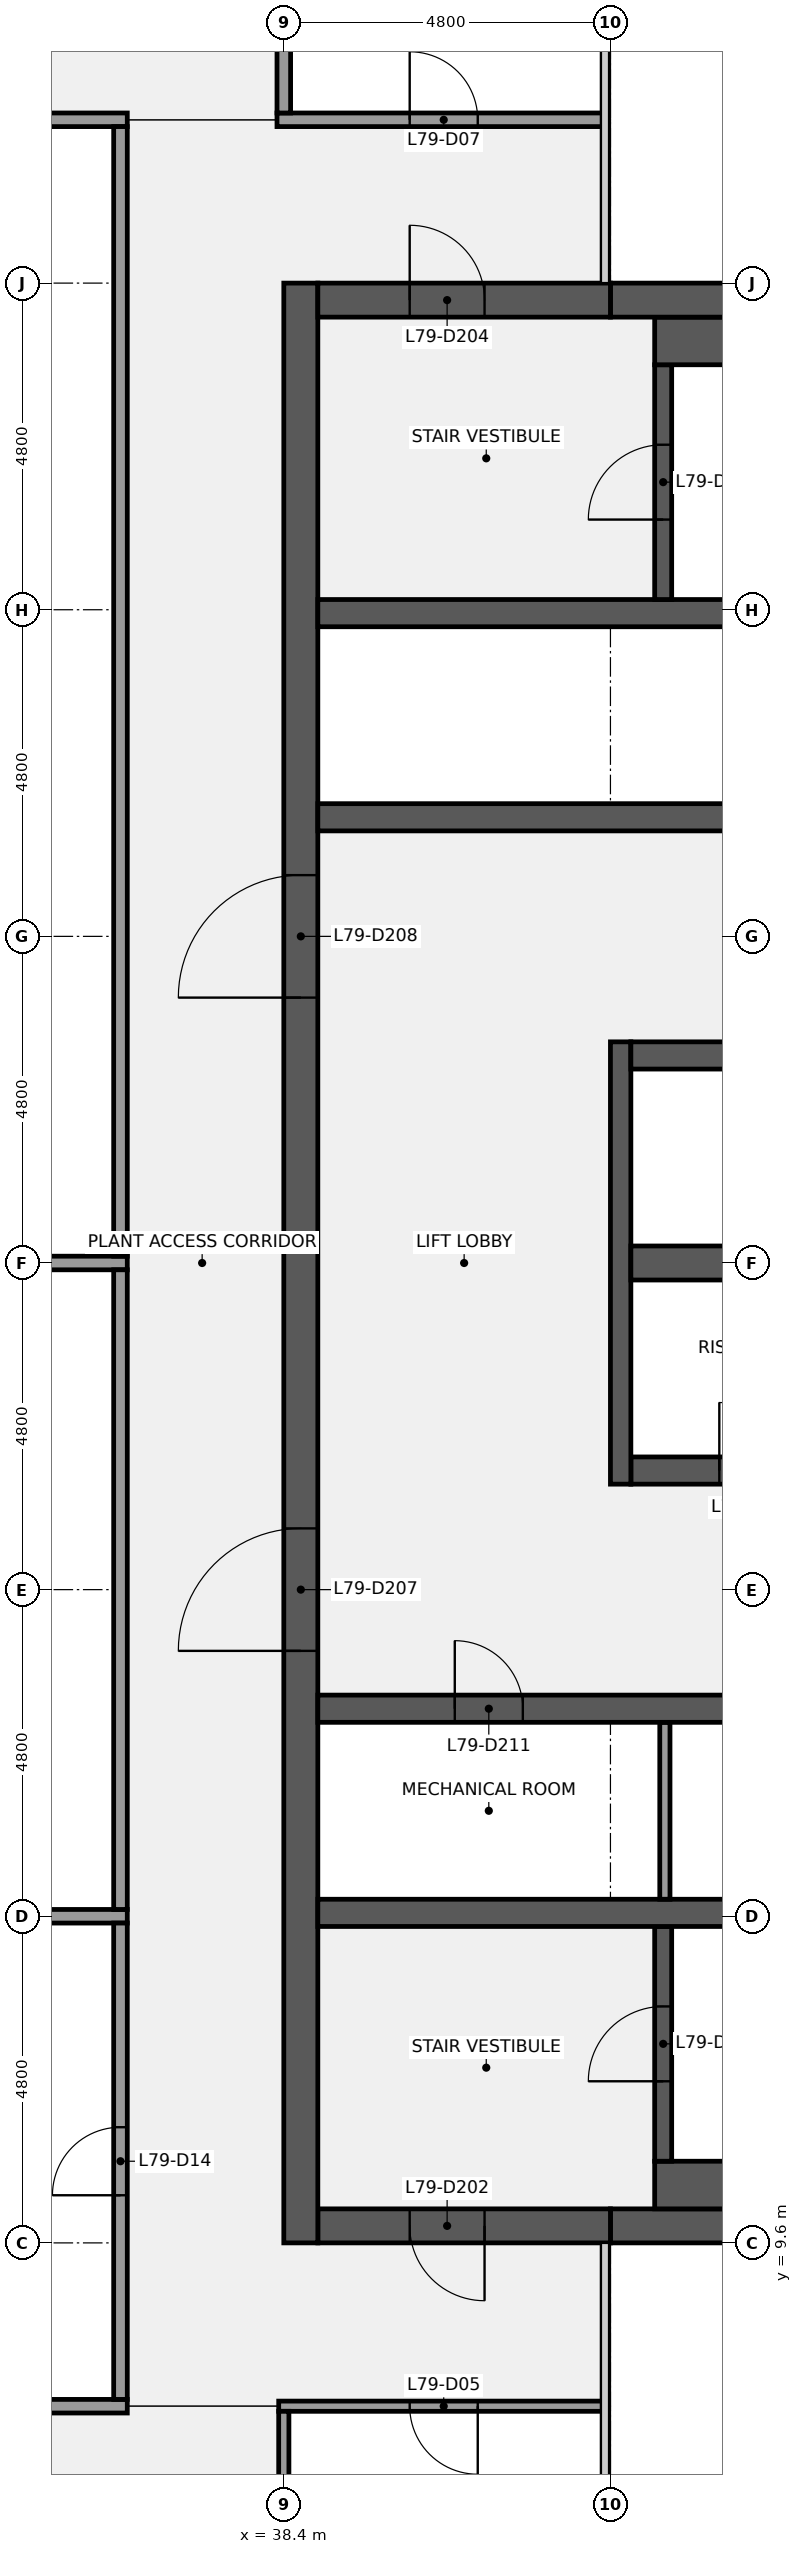
"""IFC4 building model, lengths in metres.
Left out: names, types, materials, properties, quantities, classifications, styles, units other than length and angle.
Written with IfcOpenShell. Run it as: python <this file> out.ifc"""

import sys

from ifc_helpers import new_model, si_unit, direction, frame, frame_2d, origin, place, context, subcontext, project, spatial, rectangle, extrude, element, fill, save


model = new_model("IFC4")
c1 = context("Model", 3, precision=1e-05, world=origin(), true_north=direction((0.0, 1.0)))
c2 = subcontext(c1, "Body", "Model", "MODEL_VIEW")
j1 = project(units=[si_unit("LENGTHUNIT", "METRE"), si_unit("PLANEANGLEUNIT", "RADIAN")], contexts=[c1])
p1 = place(None, origin())
s1 = spatial("IfcSite", under=j1, at=p1, CompositionType="ELEMENT")
p2 = place(p1, origin())
s2 = spatial("IfcBuilding", under=s1, at=p2, CompositionType="ELEMENT")
p3 = place(p2, frame((0.0, 0.0, 354.3)))
s3 = spatial("IfcBuildingStorey", under=s2, at=p3, CompositionType="ELEMENT", Elevation=354.3)
p4 = place(p3, frame((57.1, 9.85, 0.0), z_axis=(0.0, 0.0, 1.0), x_axis=(-1.0, 0.0, 0.0)))
e1 = element("IfcWall", 1, at=p4, inside=s3, PredefinedType="SHEAR", context=c2, shape_type="SweptSolid", body=[
    extrude(rectangle(XDim=13.9, YDim=0.5, at=frame_2d((6.95, 0.0))), origin(), (0.0, 0.0, 1.0), 3.75),
])
p5 = place(p3, frame((43.2, 9.85, 0.0), z_axis=(0.0, 0.0, 1.0), x_axis=(-1.0, 0.0, 0.0)))
e2 = element("IfcWall", 2, at=p5, inside=s3, PredefinedType="SHEAR", context=c2, shape_type="SweptSolid", body=[
    extrude(rectangle(XDim=4.3, YDim=0.5, at=frame_2d((2.15, 0.0))), origin(), (0.0, 0.0, 1.0), 3.75),
])
p6 = place(p5, frame((1.85, 0.0, 0.0)))
e3 = element("IfcOpeningElement", 3, at=p6, cuts=e2, PredefinedType="OPENING", context=c2, shape_type="SweptSolid", body=[
    extrude(rectangle(XDim=1.1, YDim=2.1, at=frame_2d((0.55, 1.05))), frame((0.0, 0.26, 0.0), z_axis=(0.0, -1.0, 0.0), x_axis=(1.0, 0.0, 0.0)), (0.0, 0.0, 1.0), 0.52),
])
p7 = place(p3, frame((38.65, 9.6, 0.0), z_axis=(0.0, 0.0, 1.0), x_axis=(0.0, 1.0, 0.0)))
e4 = element("IfcWall", 4, at=p7, inside=s3, PredefinedType="SHEAR", context=c2, shape_type="SweptSolid", body=[
    extrude(rectangle(XDim=28.8, YDim=0.5, at=frame_2d((14.4, 0.0))), origin(), (0.0, 0.0, 1.0), 3.75),
])
p8 = place(p7, frame((8.7, 0.0, 0.0)))
e5 = element("IfcOpeningElement", 5, at=p8, cuts=e4, PredefinedType="OPENING", context=c2, shape_type="SweptSolid", body=[
    extrude(rectangle(XDim=1.8, YDim=2.1, at=frame_2d((0.9, 1.05))), frame((0.0, 0.26, 0.0), z_axis=(0.0, -1.0, 0.0), x_axis=(1.0, 0.0, 0.0)), (0.0, 0.0, 1.0), 0.52),
])
p9 = place(p7, frame((18.3, 0.0, 0.0)))
e6 = element("IfcOpeningElement", 6, at=p9, cuts=e4, PredefinedType="OPENING", context=c2, shape_type="SweptSolid", body=[
    extrude(rectangle(XDim=1.8, YDim=2.1, at=frame_2d((0.9, 1.05))), frame((0.0, 0.26, 0.0), z_axis=(0.0, -1.0, 0.0), x_axis=(1.0, 0.0, 0.0)), (0.0, 0.0, 1.0), 0.52),
])
p10 = place(p3, frame((43.85, 10.45, 0.0), z_axis=(0.0, 0.0, 1.0), x_axis=(1.0, 0.0, 0.0)))
e7 = element("IfcWall", 7, at=p10, inside=s3, PredefinedType="SHEAR", context=c2, shape_type="SweptSolid", body=[
    extrude(rectangle(XDim=7.5, YDim=0.7, at=frame_2d((3.75, 0.0))), origin(), (0.0, 0.0, 1.0), 3.75),
])
p11 = place(p3, frame((43.975, 10.8, 0.0), z_axis=(0.0, 0.0, 1.0), x_axis=(0.0, 1.0, 0.0)))
e8 = element("IfcWall", 8, at=p11, inside=s3, PredefinedType="SHEAR", context=c2, shape_type="SweptSolid", body=[
    extrude(rectangle(XDim=3.45, YDim=0.25, at=frame_2d((1.725, 0.0))), origin(), (0.0, 0.0, 1.0), 3.75),
])
p12 = place(p11, frame((1.175, 0.0, 0.0)))
e9 = element("IfcOpeningElement", 9, at=p12, cuts=e8, PredefinedType="OPENING", context=c2, shape_type="SweptSolid", body=[
    extrude(rectangle(XDim=1.1, YDim=2.1, at=frame_2d((0.55, 1.05))), frame((0.0, 0.135, 0.0), z_axis=(0.0, -1.0, 0.0), x_axis=(1.0, 0.0, 0.0)), (0.0, 0.0, 1.0), 0.27),
])
p13 = place(p3, frame((38.9, 14.45, 0.0), z_axis=(0.0, 0.0, 1.0), x_axis=(1.0, 0.0, 0.0)))
e10 = element("IfcWall", 10, at=p13, inside=s3, PredefinedType="SHEAR", context=c2, shape_type="SweptSolid", body=[
    extrude(rectangle(XDim=18.2, YDim=0.4, at=frame_2d((9.1, 0.0))), origin(), (0.0, 0.0, 1.0), 3.75),
])
p14 = place(p3, frame((44.0, 14.65, 0.0), z_axis=(0.0, 0.0, 1.0), x_axis=(0.0, 1.0, 0.0)))
e11 = element("IfcWall", 11, at=p14, inside=s3, PredefinedType="PARTITIONING", context=c2, shape_type="SweptSolid", body=[
    extrude(rectangle(XDim=2.6, YDim=0.15, at=frame_2d((1.3, 0.0))), origin(), (0.0, 0.0, 1.0), 3.75),
])
p15 = place(p3, frame((38.9, 17.45, 0.0), z_axis=(0.0, 0.0, 1.0), x_axis=(1.0, 0.0, 0.0)))
e12 = element("IfcWall", 12, at=p15, inside=s3, PredefinedType="SHEAR", context=c2, shape_type="SweptSolid", body=[
    extrude(rectangle(XDim=18.2, YDim=0.4, at=frame_2d((9.1, 0.0))), origin(), (0.0, 0.0, 1.0), 3.75),
])
p16 = place(p15, frame((13.587, 0.0, 0.0)))
e13 = element("IfcOpeningElement", 13, at=p16, cuts=e12, PredefinedType="OPENING", context=c2, shape_type="SweptSolid", body=[
    extrude(rectangle(XDim=1.0, YDim=2.1, at=frame_2d((0.5, 1.05))), frame((0.0, 0.21, 0.0), z_axis=(0.0, -1.0, 0.0), x_axis=(1.0, 0.0, 0.0)), (0.0, 0.0, 1.0), 0.42),
])
p17 = place(p15, frame((7.0, 0.0, 0.0)))
e14 = element("IfcOpeningElement", 14, at=p17, cuts=e12, PredefinedType="OPENING", context=c2, shape_type="SweptSolid", body=[
    extrude(rectangle(XDim=1.0, YDim=2.1, at=frame_2d((0.5, 1.05))), frame((0.0, 0.21, 0.0), z_axis=(0.0, -1.0, 0.0), x_axis=(1.0, 0.0, 0.0)), (0.0, 0.0, 1.0), 0.42),
])
p18 = place(p15, frame((2.012, 0.0, 0.0)))
e15 = element("IfcOpeningElement", 15, at=p18, cuts=e12, PredefinedType="OPENING", context=c2, shape_type="SweptSolid", body=[
    extrude(rectangle(XDim=1.0, YDim=2.1, at=frame_2d((0.5, 1.05))), frame((0.0, 0.21, 0.0), z_axis=(0.0, -1.0, 0.0), x_axis=(1.0, 0.0, 0.0)), (0.0, 0.0, 1.0), 0.42),
])
p19 = place(p3, frame((43.5, 20.95, 0.0), z_axis=(0.0, 0.0, 1.0), x_axis=(1.0, 0.0, 0.0)))
e16 = element("IfcWall", 16, at=p19, inside=s3, PredefinedType="SHEAR", context=c2, shape_type="SweptSolid", body=[
    extrude(rectangle(XDim=13.6, YDim=0.4, at=frame_2d((6.8, 0.0))), origin(), (0.0, 0.0, 1.0), 3.75),
])
p20 = place(p19, frame((6.15, 0.0, 0.0)))
e17 = element("IfcOpeningElement", 17, at=p20, cuts=e16, PredefinedType="OPENING", context=c2, shape_type="SweptSolid", body=[
    extrude(rectangle(XDim=1.1, YDim=2.1, at=frame_2d((0.55, 1.05))), frame((0.0, 0.21, 0.0), z_axis=(0.0, -1.0, 0.0), x_axis=(1.0, 0.0, 0.0)), (0.0, 0.0, 1.0), 0.42),
])
p21 = place(p19, frame((1.3, 0.0, 0.0)))
e18 = element("IfcOpeningElement", 18, at=p21, cuts=e16, PredefinedType="OPENING", context=c2, shape_type="SweptSolid", body=[
    extrude(rectangle(XDim=1.0, YDim=2.1, at=frame_2d((0.5, 1.05))), frame((0.0, 0.21, 0.0), z_axis=(0.0, -1.0, 0.0), x_axis=(1.0, 0.0, 0.0)), (0.0, 0.0, 1.0), 0.42),
])
p22 = place(p3, frame((43.35, 20.75, 0.0), z_axis=(0.0, 0.0, 1.0), x_axis=(0.0, 1.0, 0.0)))
e19 = element("IfcWall", 19, at=p22, inside=s3, PredefinedType="SHEAR", context=c2, shape_type="SweptSolid", body=[
    extrude(rectangle(XDim=6.5, YDim=0.3, at=frame_2d((3.25, 0.0))), origin(), (0.0, 0.0, 1.0), 3.75),
])
p23 = place(p3, frame((43.5, 24.0, 0.0), z_axis=(0.0, 0.0, 1.0), x_axis=(1.0, 0.0, 0.0)))
e20 = element("IfcWall", 20, at=p23, inside=s3, PredefinedType="SHEAR", context=c2, shape_type="SweptSolid", body=[
    extrude(rectangle(XDim=13.6, YDim=0.5, at=frame_2d((6.8, 0.0))), origin(), (0.0, 0.0, 1.0), 3.75),
])
p24 = place(p3, frame((43.5, 27.05, 0.0), z_axis=(0.0, 0.0, 1.0), x_axis=(1.0, 0.0, 0.0)))
e21 = element("IfcWall", 21, at=p24, inside=s3, PredefinedType="SHEAR", context=c2, shape_type="SweptSolid", body=[
    extrude(rectangle(XDim=13.6, YDim=0.4, at=frame_2d((6.8, 0.0))), origin(), (0.0, 0.0, 1.0), 3.75),
])
p25 = place(p24, frame((8.7, 0.0, 0.0)))
e22 = element("IfcOpeningElement", 22, at=p25, cuts=e21, PredefinedType="OPENING", context=c2, shape_type="SweptSolid", body=[
    extrude(rectangle(XDim=1.0, YDim=2.1, at=frame_2d((0.5, 1.05))), frame((0.0, 0.21, 0.0), z_axis=(0.0, -1.0, 0.0), x_axis=(1.0, 0.0, 0.0)), (0.0, 0.0, 1.0), 0.42),
])
p26 = place(p24, frame((1.5, 0.0, 0.0)))
e23 = element("IfcOpeningElement", 23, at=p26, cuts=e21, PredefinedType="OPENING", context=c2, shape_type="SweptSolid", body=[
    extrude(rectangle(XDim=1.2, YDim=2.1, at=frame_2d((0.6, 1.05))), frame((0.0, 0.21, 0.0), z_axis=(0.0, -1.0, 0.0), x_axis=(1.0, 0.0, 0.0)), (0.0, 0.0, 1.0), 0.42),
])
for number, where, z_axis, x_axis in (
    (24, (38.9, 30.55, 0.0), (0.0, 0.0, 1.0), (1.0, 0.0, 0.0)),
    (25, (38.9, 33.55, 0.0), (0.0, 0.0, 1.0), (1.0, 0.0, 0.0)),
):
    element("IfcWall", number, at=place(p3, frame(where, z_axis=z_axis, x_axis=x_axis)), inside=s3, PredefinedType="SHEAR", context=c2, shape_type="SweptSolid", body=[
        extrude(rectangle(XDim=18.2, YDim=0.4, at=frame_2d((9.1, 0.0))), origin(), (0.0, 0.0, 1.0), 3.75),
    ])
p27 = place(p3, frame((43.975, 33.75, 0.0), z_axis=(0.0, 0.0, 1.0), x_axis=(0.0, 1.0, 0.0)))
e26 = element("IfcWall", 26, at=p27, inside=s3, PredefinedType="SHEAR", context=c2, shape_type="SweptSolid", body=[
    extrude(rectangle(XDim=3.45, YDim=0.25, at=frame_2d((1.725, 0.0))), origin(), (0.0, 0.0, 1.0), 3.75),
])
p28 = place(p27, frame((1.175, 0.0, 0.0)))
e27 = element("IfcOpeningElement", 27, at=p28, cuts=e26, PredefinedType="OPENING", context=c2, shape_type="SweptSolid", body=[
    extrude(rectangle(XDim=1.1, YDim=2.1, at=frame_2d((0.55, 1.05))), frame((0.0, 0.135, 0.0), z_axis=(0.0, -1.0, 0.0), x_axis=(1.0, 0.0, 0.0)), (0.0, 0.0, 1.0), 0.27),
])
p29 = place(p3, frame((43.85, 37.55, 0.0), z_axis=(0.0, 0.0, 1.0), x_axis=(1.0, 0.0, 0.0)))
e28 = element("IfcWall", 28, at=p29, inside=s3, PredefinedType="SHEAR", context=c2, shape_type="SweptSolid", body=[
    extrude(rectangle(XDim=7.5, YDim=0.7, at=frame_2d((3.75, 0.0))), origin(), (0.0, 0.0, 1.0), 3.75),
])
p30 = place(p3, frame((43.2, 38.15, 0.0), z_axis=(0.0, 0.0, 1.0), x_axis=(1.0, 0.0, 0.0)))
e29 = element("IfcWall", 29, at=p30, inside=s3, PredefinedType="SHEAR", context=c2, shape_type="SweptSolid", body=[
    extrude(rectangle(XDim=13.9, YDim=0.5, at=frame_2d((6.95, 0.0))), origin(), (0.0, 0.0, 1.0), 3.75),
])
p31 = place(p3, frame((38.9, 38.15, 0.0), z_axis=(0.0, 0.0, 1.0), x_axis=(1.0, 0.0, 0.0)))
e30 = element("IfcWall", 30, at=p31, inside=s3, PredefinedType="SHEAR", context=c2, shape_type="SweptSolid", body=[
    extrude(rectangle(XDim=4.3, YDim=0.5, at=frame_2d((2.15, 0.0))), origin(), (0.0, 0.0, 1.0), 3.75),
])
p32 = place(p31, frame((1.35, 0.0, 0.0)))
e31 = element("IfcOpeningElement", 31, at=p32, cuts=e30, PredefinedType="OPENING", context=c2, shape_type="SweptSolid", body=[
    extrude(rectangle(XDim=1.1, YDim=2.1, at=frame_2d((0.55, 1.05))), frame((0.0, 0.26, 0.0), z_axis=(0.0, -1.0, 0.0), x_axis=(1.0, 0.0, 0.0)), (0.0, 0.0, 1.0), 0.52),
])
p33 = place(p3, frame((38.325, 7.2, 0.0), z_axis=(0.0, 0.0, 1.0), x_axis=(1.0, 0.0, 0.0)))
e32 = element("IfcWall", 32, at=p33, inside=s3, PredefinedType="PARTITIONING", context=c2, shape_type="SweptSolid", body=[
    extrude(rectangle(XDim=4.775, YDim=0.15, at=frame_2d((2.388, 0.0))), origin(), (0.0, 0.0, 1.0), 2.759),
])
p34 = place(p33, frame((1.925, 0.0, 0.0)))
e33 = element("IfcOpeningElement", 33, at=p34, cuts=e32, PredefinedType="OPENING", context=c2, shape_type="SweptSolid", body=[
    extrude(rectangle(XDim=1.0, YDim=2.1, at=frame_2d((0.5, 1.05))), frame((0.0, 0.085, 0.0), z_axis=(0.0, -1.0, 0.0), x_axis=(1.0, 0.0, 0.0)), (0.0, 0.0, 1.0), 0.17),
])
for number, where, z_axis, x_axis in (
    (34, (21.5, 7.2, 0.0), (0.0, 0.0, 1.0), (1.0, 0.0, 0.0)),
    (35, (21.5, 14.4, 0.0), (0.0, 0.0, 1.0), (1.0, 0.0, 0.0)),
    (36, (21.5, 24.0, 0.0), (0.0, 0.0, 1.0), (1.0, 0.0, 0.0)),
    (37, (21.5, 40.8, 0.0), (0.0, 0.0, 1.0), (1.0, 0.0, 0.0)),
):
    element("IfcWall", number, at=place(p3, frame(where, z_axis=z_axis, x_axis=x_axis)), inside=s3, PredefinedType="PARTITIONING", context=c2, shape_type="SweptSolid", body=[
        extrude(rectangle(XDim=14.6, YDim=0.2, at=frame_2d((7.3, 0.0))), origin(), (0.0, 0.0, 1.0), 2.759),
    ])
p35 = place(p3, frame((38.3, 40.8, 0.0), z_axis=(0.0, 0.0, 1.0), x_axis=(1.0, 0.0, 0.0)))
e38 = element("IfcWall", 38, at=p35, inside=s3, PredefinedType="PARTITIONING", context=c2, shape_type="SweptSolid", body=[
    extrude(rectangle(XDim=4.8, YDim=0.2, at=frame_2d((2.4, 0.0))), origin(), (0.0, 0.0, 1.0), 2.759),
])
p36 = place(p35, frame((1.95, 0.0, 0.0)))
e39 = element("IfcOpeningElement", 39, at=p36, cuts=e38, PredefinedType="OPENING", context=c2, shape_type="SweptSolid", body=[
    extrude(rectangle(XDim=1.0, YDim=2.1, at=frame_2d((0.5, 1.05))), frame((0.0, 0.11, 0.0), z_axis=(0.0, -1.0, 0.0), x_axis=(1.0, 0.0, 0.0)), (0.0, 0.0, 1.0), 0.22),
])
p37 = place(p3, frame((36.0, 7.3, 0.0), z_axis=(0.0, 0.0, 1.0), x_axis=(0.0, 1.0, 0.0)))
e40 = element("IfcWall", 40, at=p37, inside=s3, PredefinedType="PARTITIONING", context=c2, shape_type="SweptSolid", body=[
    extrude(rectangle(XDim=7.0, YDim=0.2, at=frame_2d((3.5, 0.0))), origin(), (0.0, 0.0, 1.0), 2.759),
])
p38 = place(p37, frame((3.0, 0.0, 0.0)))
e41 = element("IfcOpeningElement", 41, at=p38, cuts=e40, PredefinedType="OPENING", context=c2, shape_type="SweptSolid", body=[
    extrude(rectangle(XDim=1.0, YDim=2.1, at=frame_2d((0.5, 1.05))), frame((0.0, 0.11, 0.0), z_axis=(0.0, -1.0, 0.0), x_axis=(1.0, 0.0, 0.0)), (0.0, 0.0, 1.0), 0.22),
])
p39 = place(p3, frame((36.0, 14.5, 0.0), z_axis=(0.0, 0.0, 1.0), x_axis=(0.0, 1.0, 0.0)))
e42 = element("IfcWall", 42, at=p39, inside=s3, PredefinedType="PARTITIONING", context=c2, shape_type="SweptSolid", body=[
    extrude(rectangle(XDim=9.4, YDim=0.2, at=frame_2d((4.7, 0.0))), origin(), (0.0, 0.0, 1.0), 2.759),
])
p40 = place(p3, frame((36.0, 24.1, 0.0), z_axis=(0.0, 0.0, 1.0), x_axis=(0.0, 1.0, 0.0)))
e43 = element("IfcWall", 43, at=p40, inside=s3, PredefinedType="PARTITIONING", context=c2, shape_type="SweptSolid", body=[
    extrude(rectangle(XDim=16.6, YDim=0.2, at=frame_2d((8.3, 0.0))), origin(), (0.0, 0.0, 1.0), 2.759),
])
p41 = place(p3, frame((38.4, 4.9, 0.0), z_axis=(0.0, 0.0, 1.0), x_axis=(0.0, 1.0, 0.0)))
e44 = element("IfcWall", 44, at=p41, inside=s3, PredefinedType="PARTITIONING", context=c2, shape_type="SweptSolid", body=[
    extrude(rectangle(XDim=2.225, YDim=0.15, at=frame_2d((1.113, 0.0))), origin(), (0.0, 0.0, 1.0), 2.759),
])
p42 = place(p3, frame((38.4, 40.9, 0.0), z_axis=(0.0, 0.0, 1.0), x_axis=(0.0, 1.0, 0.0)))
e45 = element("IfcWall", 45, at=p42, inside=s3, PredefinedType="PARTITIONING", context=c2, shape_type="SweptSolid", body=[
    extrude(rectangle(XDim=2.2, YDim=0.2, at=frame_2d((1.1, 0.0))), origin(), (0.0, 0.0, 1.0), 2.759),
])
p43 = place(p12, origin())
e46 = element("IfcDoor", 46, at=p43, inside=s3, OperationType="SINGLE_SWING_LEFT", PredefinedType="DOOR", context=c2, shape_type="SweptSolid", body=[
    extrude(rectangle(XDim=1.1, YDim=2.1, at=frame_2d((0.55, 1.05))), frame((0.0, 0.025, 0.0), z_axis=(0.0, -1.0, 0.0), x_axis=(1.0, 0.0, 0.0)), (0.0, 0.0, 1.0), 0.05),
])
fill(e9, e46)
p44 = place(p6, origin())
e47 = element("IfcDoor", 47, at=p44, inside=s3, OperationType="SINGLE_SWING_LEFT", PredefinedType="DOOR", context=c2, shape_type="SweptSolid", body=[
    extrude(rectangle(XDim=1.1, YDim=2.1, at=frame_2d((0.55, 1.05))), frame((0.0, 0.025, 0.0), z_axis=(0.0, -1.0, 0.0), x_axis=(1.0, 0.0, 0.0)), (0.0, 0.0, 1.0), 0.05),
])
fill(e3, e47)
p45 = place(p28, origin())
e48 = element("IfcDoor", 48, at=p45, inside=s3, OperationType="SINGLE_SWING_LEFT", PredefinedType="DOOR", context=c2, shape_type="SweptSolid", body=[
    extrude(rectangle(XDim=1.1, YDim=2.1, at=frame_2d((0.55, 1.05))), frame((0.0, 0.025, 0.0), z_axis=(0.0, -1.0, 0.0), x_axis=(1.0, 0.0, 0.0)), (0.0, 0.0, 1.0), 0.05),
])
fill(e27, e48)
p46 = place(p32, origin())
e49 = element("IfcDoor", 49, at=p46, inside=s3, OperationType="SINGLE_SWING_LEFT", PredefinedType="DOOR", context=c2, shape_type="SweptSolid", body=[
    extrude(rectangle(XDim=1.1, YDim=2.1, at=frame_2d((0.55, 1.05))), frame((0.0, 0.025, 0.0), z_axis=(0.0, -1.0, 0.0), x_axis=(1.0, 0.0, 0.0)), (0.0, 0.0, 1.0), 0.05),
])
fill(e31, e49)
p47 = place(p21, origin())
e50 = element("IfcDoor", 50, at=p47, inside=s3, OperationType="SINGLE_SWING_LEFT", PredefinedType="DOOR", context=c2, shape_type="SweptSolid", body=[
    extrude(rectangle(XDim=1.0, YDim=2.1, at=frame_2d((0.5, 1.05))), frame((0.0, 0.025, 0.0), z_axis=(0.0, -1.0, 0.0), x_axis=(1.0, 0.0, 0.0)), (0.0, 0.0, 1.0), 0.05),
])
fill(e18, e50)
p48 = place(p8, origin())
e51 = element("IfcDoor", 51, at=p48, inside=s3, OperationType="DOUBLE_DOOR_SINGLE_SWING", PredefinedType="DOOR", context=c2, shape_type="SweptSolid", body=[
    extrude(rectangle(XDim=1.8, YDim=2.1, at=frame_2d((0.9, 1.05))), frame((0.0, 0.025, 0.0), z_axis=(0.0, -1.0, 0.0), x_axis=(1.0, 0.0, 0.0)), (0.0, 0.0, 1.0), 0.05),
])
fill(e5, e51)
p49 = place(p9, origin())
e52 = element("IfcDoor", 52, at=p49, inside=s3, OperationType="DOUBLE_DOOR_SINGLE_SWING", PredefinedType="DOOR", context=c2, shape_type="SweptSolid", body=[
    extrude(rectangle(XDim=1.8, YDim=2.1, at=frame_2d((0.9, 1.05))), frame((0.0, 0.025, 0.0), z_axis=(0.0, -1.0, 0.0), x_axis=(1.0, 0.0, 0.0)), (0.0, 0.0, 1.0), 0.05),
])
fill(e6, e52)
p50 = place(p18, origin())
e53 = element("IfcDoor", 53, at=p50, inside=s3, OperationType="SINGLE_SWING_LEFT", PredefinedType="DOOR", context=c2, shape_type="SweptSolid", body=[
    extrude(rectangle(XDim=1.0, YDim=2.1, at=frame_2d((0.5, 1.05))), frame((0.0, 0.025, 0.0), z_axis=(0.0, -1.0, 0.0), x_axis=(1.0, 0.0, 0.0)), (0.0, 0.0, 1.0), 0.05),
])
fill(e15, e53)
p51 = place(p34, origin())
e54 = element("IfcDoor", 54, at=p51, inside=s3, OperationType="SINGLE_SWING_RIGHT", PredefinedType="DOOR", context=c2, shape_type="SweptSolid", body=[
    extrude(rectangle(XDim=1.0, YDim=2.1, at=frame_2d((0.5, 1.05))), frame((0.0, 0.025, 0.0), z_axis=(0.0, -1.0, 0.0), x_axis=(1.0, 0.0, 0.0)), (0.0, 0.0, 1.0), 0.05),
])
fill(e33, e54)
p52 = place(p36, origin())
e55 = element("IfcDoor", 55, at=p52, inside=s3, OperationType="SINGLE_SWING_LEFT", PredefinedType="DOOR", context=c2, shape_type="SweptSolid", body=[
    extrude(rectangle(XDim=1.0, YDim=2.1, at=frame_2d((0.5, 1.05))), frame((0.0, 0.025, 0.0), z_axis=(0.0, -1.0, 0.0), x_axis=(1.0, 0.0, 0.0)), (0.0, 0.0, 1.0), 0.05),
])
fill(e39, e55)
p53 = place(p38, origin())
e56 = element("IfcDoor", 56, at=p53, inside=s3, OperationType="SINGLE_SWING_LEFT", PredefinedType="DOOR", context=c2, shape_type="SweptSolid", body=[
    extrude(rectangle(XDim=1.0, YDim=2.1, at=frame_2d((0.5, 1.05))), frame((0.0, 0.025, 0.0), z_axis=(0.0, -1.0, 0.0), x_axis=(1.0, 0.0, 0.0)), (0.0, 0.0, 1.0), 0.05),
])
fill(e41, e56)
save(model, sys.argv[1])
